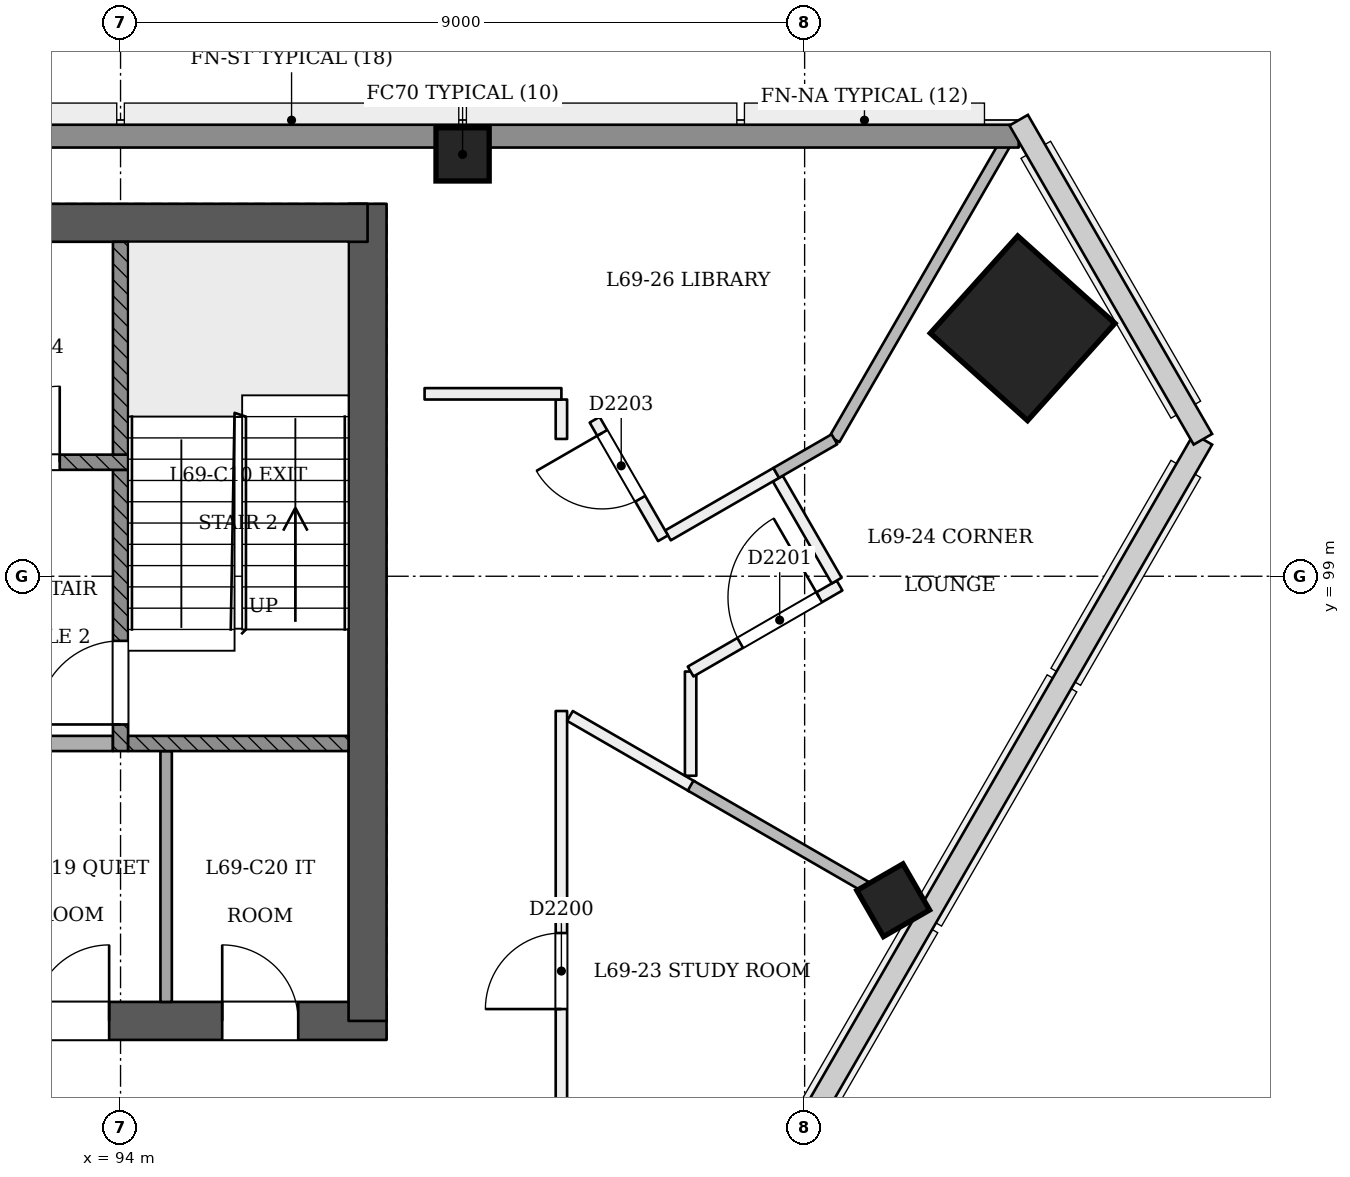
"""IFC4 building model, lengths in metres.
Left out: names, types, materials, properties, quantities, classifications, styles, units other than length and angle.
Written with IfcOpenShell. Run it as: python <this file> out.ifc"""

import sys

from ifc_helpers import new_model, si_unit, direction, frame, frame_2d, origin, origin_2d, place, context, subcontext, project, spatial, rectangle, extrude, element, fill, save


model = new_model("IFC4")
c1 = context("Model", 3, precision=1e-05, world=origin(), true_north=direction((0.0, 1.0)))
c2 = subcontext(c1, "Body", "Model", "MODEL_VIEW")
j1 = project(units=[si_unit("LENGTHUNIT", "METRE"), si_unit("PLANEANGLEUNIT", "RADIAN")], contexts=[c1])
p1 = place(None, origin())
s1 = spatial("IfcSite", under=j1, at=p1, CompositionType="ELEMENT")
p2 = place(p1, origin())
s2 = spatial("IfcBuilding", under=s1, at=p2, CompositionType="ELEMENT")
p3 = place(p2, frame((0.0, 0.0, 268.0)))
s3 = spatial("IfcBuildingStorey", under=s2, at=p3, CompositionType="ELEMENT", Elevation=268.0)
p4 = place(p3, frame((72.75, 93.15, 0.0), z_axis=(0.0, 0.0, 1.0), x_axis=(1.0, 0.0, 0.0)))
e1 = element("IfcWall", 1, at=p4, inside=s3, PredefinedType="SHEAR", context=c2, shape_type="SweptSolid", body=[
    extrude(rectangle(XDim=24.75, YDim=0.5, at=frame_2d((12.375, 0.0))), origin(), (0.0, 0.0, 1.0), 3.6),
])
p5 = place(p4, frame((1.05, 0.0, 0.0)))
e2 = element("IfcOpeningElement", 2, at=p5, cuts=e1, PredefinedType="OPENING", context=c2, shape_type="SweptSolid", body=[
    extrude(rectangle(XDim=1.2, YDim=2.1, at=frame_2d((0.6, 1.05))), frame((0.0, 0.26, 0.0), z_axis=(0.0, -1.0, 0.0), x_axis=(1.0, 0.0, 0.0)), (0.0, 0.0, 1.0), 0.521),
])
p6 = place(p4, frame((3.25, 0.0, 0.0)))
e3 = element("IfcOpeningElement", 3, at=p6, cuts=e1, PredefinedType="OPENING", context=c2, shape_type="SweptSolid", body=[
    extrude(rectangle(XDim=1.2, YDim=2.1, at=frame_2d((0.6, 1.05))), frame((0.0, 0.26, 0.0), z_axis=(0.0, -1.0, 0.0), x_axis=(1.0, 0.0, 0.0)), (0.0, 0.0, 1.0), 0.521),
])
p7 = place(p4, frame((13.25, 0.0, 0.0)))
e4 = element("IfcOpeningElement", 4, at=p7, cuts=e1, PredefinedType="OPENING", context=c2, shape_type="SweptSolid", body=[
    extrude(rectangle(XDim=1.2, YDim=2.1, at=frame_2d((0.6, 1.05))), frame((0.0, 0.26, 0.0), z_axis=(0.0, -1.0, 0.0), x_axis=(1.0, 0.0, 0.0)), (0.0, 0.0, 1.0), 0.521),
])
p8 = place(p4, frame((15.312, 0.0, 0.0)))
e5 = element("IfcOpeningElement", 5, at=p8, cuts=e1, PredefinedType="OPENING", context=c2, shape_type="SweptSolid", body=[
    extrude(rectangle(XDim=1.0, YDim=2.1, at=frame_2d((0.5, 1.05))), frame((0.0, 0.26, 0.0), z_axis=(0.0, -1.0, 0.0), x_axis=(1.0, 0.0, 0.0)), (0.0, 0.0, 1.0), 0.521),
])
p9 = place(p4, frame((17.55, 0.0, 0.0)))
e6 = element("IfcOpeningElement", 6, at=p9, cuts=e1, PredefinedType="OPENING", context=c2, shape_type="SweptSolid", body=[
    extrude(rectangle(XDim=1.0, YDim=2.1, at=frame_2d((0.5, 1.05))), frame((0.0, 0.26, 0.0), z_axis=(0.0, -1.0, 0.0), x_axis=(1.0, 0.0, 0.0)), (0.0, 0.0, 1.0), 0.521),
])
p10 = place(p4, frame((20.1, 0.0, 0.0)))
e7 = element("IfcOpeningElement", 7, at=p10, cuts=e1, PredefinedType="OPENING", context=c2, shape_type="SweptSolid", body=[
    extrude(rectangle(XDim=1.0, YDim=2.1, at=frame_2d((0.5, 1.05))), frame((0.0, 0.26, 0.0), z_axis=(0.0, -1.0, 0.0), x_axis=(1.0, 0.0, 0.0)), (0.0, 0.0, 1.0), 0.521),
])
p11 = place(p4, frame((22.587, 0.0, 0.0)))
e8 = element("IfcOpeningElement", 8, at=p11, cuts=e1, PredefinedType="OPENING", context=c2, shape_type="SweptSolid", body=[
    extrude(rectangle(XDim=1.0, YDim=2.1, at=frame_2d((0.5, 1.05))), frame((0.0, 0.26, 0.0), z_axis=(0.0, -1.0, 0.0), x_axis=(1.0, 0.0, 0.0)), (0.0, 0.0, 1.0), 0.521),
])
p12 = place(p3, frame((97.25, 93.15, 0.0), z_axis=(0.0, 0.0, 1.0), x_axis=(0.0, 1.0, 0.0)))
e9 = element("IfcWall", 9, at=p12, inside=s3, PredefinedType="SHEAR", context=c2, shape_type="SweptSolid", body=[
    extrude(rectangle(XDim=10.75, YDim=0.5, at=frame_2d((5.375, 0.0))), origin(), (0.0, 0.0, 1.0), 3.6),
])
p13 = place(p3, frame((97.25, 103.65, 0.0), z_axis=(0.0, 0.0, 1.0), x_axis=(-1.0, 0.0, 0.0)))
e10 = element("IfcWall", 10, at=p13, inside=s3, PredefinedType="SHEAR", context=c2, shape_type="SweptSolid", body=[
    extrude(rectangle(XDim=24.75, YDim=0.5, at=frame_2d((12.375, 0.0))), origin(), (0.0, 0.0, 1.0), 3.6),
])
p14 = place(p3, frame((105.902, 102.251, 0.0), z_axis=(-0.028401796786, 0.009286506348, 0.999553449666), x_axis=(0.498876209332, -0.866388246574, 0.022224625084)))
e11 = element("IfcColumn", 11, at=p14, inside=s3, PredefinedType="COLUMN", context=c2, shape_type="SweptSolid", body=[
    extrude(rectangle(XDim=1.72, YDim=1.72, at=origin_2d()), origin(), (0.0, 0.0, 1.0), 3.602),
])
p15 = place(p3, frame((98.5, 104.55, 0.0), z_axis=(0.0, 0.0, 1.0), x_axis=(1.0, 0.0, 0.0)))
e12 = element("IfcColumn", 12, at=p15, inside=s3, PredefinedType="COLUMN", context=c2, shape_type="SweptSolid", body=[
    extrude(rectangle(XDim=0.7, YDim=0.7, at=origin_2d()), origin(), (0.0, 0.0, 1.0), 3.6),
])
p16 = place(p3, frame((104.192, 94.69, -0.021), z_axis=(-0.02215369191, 0.038413282303, 0.999016333038), x_axis=(-0.500652759639, -0.865364210869, 0.022171982582)))
e13 = element("IfcColumn", 13, at=p16, inside=s3, PredefinedType="COLUMN", context=c2, shape_type="SweptSolid", body=[
    extrude(rectangle(XDim=0.7, YDim=0.7, at=origin_2d()), origin(), (0.0, 0.0, 1.0), 3.604),
])
p17 = place(p3, frame((99.8, 90.6, 0.0), z_axis=(0.0, 0.0, 1.0), x_axis=(0.0, 1.0, 0.0)))
e14 = element("IfcWall", 14, at=p17, inside=s3, PredefinedType="PARTITIONING", context=c2, shape_type="SweptSolid", body=[
    extrude(rectangle(XDim=6.627, YDim=0.15, at=frame_2d((3.313, 0.0))), origin(), (0.0, 0.0, 1.0), 3.2),
])
p18 = place(p17, frame((2.706, 0.0, 0.0)))
e15 = element("IfcOpeningElement", 15, at=p18, cuts=e14, PredefinedType="OPENING", context=c2, shape_type="SweptSolid", body=[
    extrude(rectangle(XDim=1.0, YDim=2.1, at=frame_2d((0.5, 1.05))), frame((0.0, 0.085, 0.0), z_axis=(0.0, -1.0, 0.0), x_axis=(1.0, 0.0, 0.0)), (0.0, 0.0, 1.0), 0.171),
])
p19 = place(p3, frame((99.913, 97.162, 0.0), z_axis=(0.0, 0.0, 1.0), x_axis=(0.866021029023, -0.500007577232, 0.0)))
e16 = element("IfcWall", 16, at=p19, inside=s3, PredefinedType="PARTITIONING", context=c2, shape_type="SweptSolid", body=[
    extrude(rectangle(XDim=1.853, YDim=0.15, at=frame_2d((0.927, 0.0))), origin(), (0.0, 0.0, 1.0), 3.2),
])
p20 = place(p3, frame((101.5, 96.375, 0.0), z_axis=(0.0, 0.0, 1.0), x_axis=(0.0, 1.0, 0.0)))
e17 = element("IfcWall", 17, at=p20, inside=s3, PredefinedType="PARTITIONING", context=c2, shape_type="SweptSolid", body=[
    extrude(rectangle(XDim=1.371, YDim=0.15, at=frame_2d((0.686, 0.0))), origin(), (0.0, 0.0, 1.0), 3.2),
])
p21 = place(p3, frame((101.5, 97.747, 0.0), z_axis=(0.0, 0.0, 1.0), x_axis=(0.866036427558, 0.499980905779, 0.0)))
e18 = element("IfcWall", 18, at=p21, inside=s3, PredefinedType="PARTITIONING", context=c2, shape_type="SweptSolid", body=[
    extrude(rectangle(XDim=2.262, YDim=0.15, at=frame_2d((1.131, 0.0))), origin(), (0.0, 0.0, 1.0), 3.2),
])
p22 = place(p21, frame((0.753, 0.0, 0.0)))
e19 = element("IfcOpeningElement", 19, at=p22, cuts=e18, PredefinedType="OPENING", context=c2, shape_type="SweptSolid", body=[
    extrude(rectangle(XDim=1.2, YDim=2.1, at=frame_2d((0.6, 1.05))), frame((0.0, 0.085, 0.0), z_axis=(0.0, -1.0, 0.0), x_axis=(1.0, 0.0, 0.0)), (0.0, 0.0, 1.0), 0.171),
])
p23 = place(p3, frame((103.422, 98.943, 0.0), z_axis=(0.0, 0.0, 1.0), x_axis=(-0.500017819788, 0.86601511528, 0.0)))
e20 = element("IfcWall", 20, at=p23, inside=s3, PredefinedType="PARTITIONING", context=c2, shape_type="SweptSolid", body=[
    extrude(rectangle(XDim=1.55, YDim=0.15, at=frame_2d((0.775, 0.0))), origin(), (0.0, 0.0, 1.0), 3.2),
])
p24 = place(p3, frame((102.627, 100.36, 0.0), z_axis=(0.0, 0.0, 1.0), x_axis=(-0.866052144996, -0.499953680002, 0.0)))
e21 = element("IfcWall", 21, at=p24, inside=s3, PredefinedType="PARTITIONING", context=c2, shape_type="SweptSolid", body=[
    extrude(rectangle(XDim=1.645, YDim=0.15, at=frame_2d((0.823, 0.0))), origin(), (0.0, 0.0, 1.0), 3.2),
])
p25 = place(p3, frame((101.137, 99.5, 0.0), z_axis=(0.0, 0.0, 1.0), x_axis=(-0.499961193289, 0.866047807691, 0.0)))
e22 = element("IfcWall", 22, at=p25, inside=s3, PredefinedType="PARTITIONING", context=c2, shape_type="SweptSolid", body=[
    extrude(rectangle(XDim=1.8, YDim=0.15, at=frame_2d((0.9, 0.0))), origin(), (0.0, 0.0, 1.0), 3.2),
])
p26 = place(p25, frame((0.6, 0.0, 0.0)))
e23 = element("IfcOpeningElement", 23, at=p26, cuts=e22, PredefinedType="OPENING", context=c2, shape_type="SweptSolid", body=[
    extrude(rectangle(XDim=1.0, YDim=2.1, at=frame_2d((0.5, 1.05))), frame((0.0, 0.085, 0.0), z_axis=(0.0, -1.0, 0.0), x_axis=(1.0, 0.0, 0.0)), (0.0, 0.0, 1.0), 0.171),
])
p27 = place(p3, frame((99.8, 100.806, 0.0), z_axis=(0.0, 0.0, 1.0), x_axis=(0.0, 1.0, 0.0)))
e24 = element("IfcWall", 24, at=p27, inside=s3, PredefinedType="PARTITIONING", context=c2, shape_type="SweptSolid", body=[
    extrude(rectangle(XDim=0.519, YDim=0.15, at=frame_2d((0.259, 0.0))), origin(), (0.0, 0.0, 1.0), 3.2),
])
p28 = place(p3, frame((99.8, 101.4, 0.0), z_axis=(0.0, 0.0, 1.0), x_axis=(-1.0, 0.0, 0.0)))
e25 = element("IfcWall", 25, at=p28, inside=s3, PredefinedType="PARTITIONING", context=c2, shape_type="SweptSolid", body=[
    extrude(rectangle(XDim=1.8, YDim=0.15, at=frame_2d((0.9, 0.0))), origin(), (0.0, 0.0, 1.0), 3.2),
])
p29 = place(p3, frame((104.495, 94.516, 0.0), z_axis=(0.0, 0.0, 1.0), x_axis=(-0.866053925764, 0.499950595228, 0.0)))
e26 = element("IfcWall", 26, at=p29, inside=s3, PredefinedType="PARTITIONING", context=c2, shape_type="SweptSolid", body=[
    extrude(rectangle(XDim=3.458, YDim=0.15, at=frame_2d((1.729, 0.0))), origin(), (0.0, 0.0, 1.0), 2.7),
])
p30 = place(p3, frame((105.758, 104.9, 0.0), z_axis=(0.0, 0.0, 1.0), x_axis=(-0.500006800136, -0.866021477689, 0.0)))
e27 = element("IfcWall", 27, at=p30, inside=s3, PredefinedType="PARTITIONING", context=c2, shape_type="SweptSolid", body=[
    extrude(rectangle(XDim=4.732, YDim=0.15, at=frame_2d((2.366, 0.0))), origin(), (0.0, 0.0, 1.0), 2.7),
])
p31 = place(p3, frame((103.392, 100.802, 0.0), z_axis=(0.0, 0.0, 1.0), x_axis=(-0.866093614288, -0.499881837328, 0.0)))
e28 = element("IfcWall", 28, at=p31, inside=s3, PredefinedType="PARTITIONING", context=c2, shape_type="SweptSolid", body=[
    extrude(rectangle(XDim=0.884, YDim=0.15, at=frame_2d((0.442, 0.0))), origin(), (0.0, 0.0, 1.0), 3.2),
])
p32 = place(p3, frame((64.184, 104.79, 0.0), z_axis=(0.0, 0.0, 1.0), x_axis=(1.0, 0.0, 0.0)))
e29 = element("IfcWall", 29, at=p32, inside=s3, PredefinedType="SOLIDWALL", context=c2, shape_type="SweptSolid", body=[
    extrude(rectangle(XDim=41.632, YDim=0.3, at=frame_2d((20.816, 0.0))), origin(), (0.0, 0.0, 1.0), 2.7),
])
p33 = place(p3, frame((94.6, 93.4, 0.0), z_axis=(0.0, 0.0, 1.0), x_axis=(0.0, 1.0, 0.0)))
e30 = element("IfcWall", 30, at=p33, inside=s3, PredefinedType="PARTITIONING", context=c2, shape_type="SweptSolid", body=[
    extrude(rectangle(XDim=3.3, YDim=0.15, at=frame_2d((1.65, 0.0))), origin(), (0.0, 0.0, 1.0), 3.2),
])
p34 = place(p3, frame((91.5, 96.8, 0.0), z_axis=(0.0, 0.0, 1.0), x_axis=(1.0, 0.0, 0.0)))
e31 = element("IfcWall", 31, at=p34, inside=s3, PredefinedType="PARTITIONING", context=c2, shape_type="SweptSolid", body=[
    extrude(rectangle(XDim=2.4, YDim=0.2, at=frame_2d((1.2, 0.0))), origin(), (0.0, 0.0, 1.0), 3.2),
])
p35 = place(p3, frame((94.0, 96.7, 0.0), z_axis=(0.0, 0.0, 1.0), x_axis=(0.0, 1.0, 0.0)))
e32 = element("IfcWall", 32, at=p35, inside=s3, PredefinedType="SOLIDWALL", context=c2, shape_type="SweptSolid", body=[
    extrude(rectangle(XDim=3.7, YDim=0.2, at=frame_2d((1.85, 0.0))), origin(), (0.0, 0.0, 1.0), 3.2),
])
p36 = place(p35, frame((0.35, 0.0, 0.0)))
e33 = element("IfcOpeningElement", 33, at=p36, cuts=e32, PredefinedType="OPENING", context=c2, shape_type="SweptSolid", body=[
    extrude(rectangle(XDim=1.1, YDim=2.1, at=frame_2d((0.55, 1.05))), frame((0.0, 0.11, 0.0), z_axis=(0.0, -1.0, 0.0), x_axis=(1.0, 0.0, 0.0)), (0.0, 0.0, 1.0), 0.221),
])
p37 = place(p3, frame((94.1, 96.8, 0.0), z_axis=(0.0, 0.0, 1.0), x_axis=(1.0, 0.0, 0.0)))
e34 = element("IfcWall", 34, at=p37, inside=s3, PredefinedType="SOLIDWALL", context=c2, shape_type="SweptSolid", body=[
    extrude(rectangle(XDim=2.9, YDim=0.2, at=frame_2d((1.45, 0.0))), origin(), (0.0, 0.0, 1.0), 3.2),
])
p38 = place(p3, frame((75.9, 100.5, 0.0), z_axis=(0.0, 0.0, 1.0), x_axis=(1.0, 0.0, 0.0)))
e35 = element("IfcWall", 35, at=p38, inside=s3, PredefinedType="SOLIDWALL", context=c2, shape_type="SweptSolid", body=[
    extrude(rectangle(XDim=18.2, YDim=0.2, at=frame_2d((9.1, 0.0))), origin(), (0.0, 0.0, 1.0), 3.2),
])
p39 = place(p38, frame((2.6, 0.0, 0.0)))
e36 = element("IfcOpeningElement", 36, at=p39, cuts=e35, PredefinedType="OPENING", context=c2, shape_type="SweptSolid", body=[
    extrude(rectangle(XDim=1.1, YDim=2.1, at=frame_2d((0.55, 1.05))), frame((0.0, 0.11, 0.0), z_axis=(0.0, -1.0, 0.0), x_axis=(1.0, 0.0, 0.0)), (0.0, 0.0, 1.0), 0.221),
])
p40 = place(p38, frame((4.5, 0.0, 0.0)))
e37 = element("IfcOpeningElement", 37, at=p40, cuts=e35, PredefinedType="OPENING", context=c2, shape_type="SweptSolid", body=[
    extrude(rectangle(XDim=1.1, YDim=2.1, at=frame_2d((0.55, 1.05))), frame((0.0, 0.11, 0.0), z_axis=(0.0, -1.0, 0.0), x_axis=(1.0, 0.0, 0.0)), (0.0, 0.0, 1.0), 0.221),
])
p41 = place(p38, frame((6.4, 0.0, 0.0)))
e38 = element("IfcOpeningElement", 38, at=p41, cuts=e35, PredefinedType="OPENING", context=c2, shape_type="SweptSolid", body=[
    extrude(rectangle(XDim=1.1, YDim=2.1, at=frame_2d((0.55, 1.05))), frame((0.0, 0.11, 0.0), z_axis=(0.0, -1.0, 0.0), x_axis=(1.0, 0.0, 0.0)), (0.0, 0.0, 1.0), 0.221),
])
p42 = place(p38, frame((8.3, 0.0, 0.0)))
e39 = element("IfcOpeningElement", 39, at=p42, cuts=e35, PredefinedType="OPENING", context=c2, shape_type="SweptSolid", body=[
    extrude(rectangle(XDim=1.1, YDim=2.1, at=frame_2d((0.55, 1.05))), frame((0.0, 0.11, 0.0), z_axis=(0.0, -1.0, 0.0), x_axis=(1.0, 0.0, 0.0)), (0.0, 0.0, 1.0), 0.221),
])
p43 = place(p38, frame((10.2, 0.0, 0.0)))
e40 = element("IfcOpeningElement", 40, at=p43, cuts=e35, PredefinedType="OPENING", context=c2, shape_type="SweptSolid", body=[
    extrude(rectangle(XDim=1.1, YDim=2.1, at=frame_2d((0.55, 1.05))), frame((0.0, 0.11, 0.0), z_axis=(0.0, -1.0, 0.0), x_axis=(1.0, 0.0, 0.0)), (0.0, 0.0, 1.0), 0.221),
])
p44 = place(p38, frame((12.1, 0.0, 0.0)))
e41 = element("IfcOpeningElement", 41, at=p44, cuts=e35, PredefinedType="OPENING", context=c2, shape_type="SweptSolid", body=[
    extrude(rectangle(XDim=1.1, YDim=2.1, at=frame_2d((0.55, 1.05))), frame((0.0, 0.11, 0.0), z_axis=(0.0, -1.0, 0.0), x_axis=(1.0, 0.0, 0.0)), (0.0, 0.0, 1.0), 0.221),
])
p45 = place(p38, frame((14.0, 0.0, 0.0)))
e42 = element("IfcOpeningElement", 42, at=p45, cuts=e35, PredefinedType="OPENING", context=c2, shape_type="SweptSolid", body=[
    extrude(rectangle(XDim=1.1, YDim=2.1, at=frame_2d((0.55, 1.05))), frame((0.0, 0.11, 0.0), z_axis=(0.0, -1.0, 0.0), x_axis=(1.0, 0.0, 0.0)), (0.0, 0.0, 1.0), 0.221),
])
p46 = place(p38, frame((0.65, 0.0, 0.0)))
e43 = element("IfcOpeningElement", 43, at=p46, cuts=e35, PredefinedType="OPENING", context=c2, shape_type="SweptSolid", body=[
    extrude(rectangle(XDim=1.0, YDim=2.1, at=frame_2d((0.5, 1.05))), frame((0.0, 0.11, 0.0), z_axis=(0.0, -1.0, 0.0), x_axis=(1.0, 0.0, 0.0)), (0.0, 0.0, 1.0), 0.221),
])
p47 = place(p38, frame((16.3, 0.0, 0.0)))
e44 = element("IfcOpeningElement", 44, at=p47, cuts=e35, PredefinedType="OPENING", context=c2, shape_type="SweptSolid", body=[
    extrude(rectangle(XDim=1.0, YDim=2.1, at=frame_2d((0.5, 1.05))), frame((0.0, 0.11, 0.0), z_axis=(0.0, -1.0, 0.0), x_axis=(1.0, 0.0, 0.0)), (0.0, 0.0, 1.0), 0.221),
])
p48 = place(p3, frame((94.0, 100.6, 0.0), z_axis=(0.0, 0.0, 1.0), x_axis=(0.0, 1.0, 0.0)))
e45 = element("IfcWall", 45, at=p48, inside=s3, PredefinedType="SOLIDWALL", context=c2, shape_type="SweptSolid", body=[
    extrude(rectangle(XDim=2.8, YDim=0.2, at=frame_2d((1.4, 0.0))), origin(), (0.0, 0.0, 1.0), 3.2),
])
p49 = place(p18, origin())
e46 = element("IfcDoor", 46, at=p49, inside=s3, OperationType="SINGLE_SWING_LEFT", PredefinedType="NOTDEFINED", context=c2, shape_type="SweptSolid", body=[
    extrude(rectangle(XDim=1.0, YDim=2.1, at=frame_2d((0.5, 1.05))), frame((0.0, 0.025, 0.0), z_axis=(0.0, -1.0, 0.0), x_axis=(1.0, 0.0, 0.0)), (0.0, 0.0, 1.0), 0.05),
])
fill(e15, e46)
p50 = place(p22, origin())
e47 = element("IfcDoor", 47, at=p50, inside=s3, OperationType="SINGLE_SWING_RIGHT", PredefinedType="NOTDEFINED", context=c2, shape_type="SweptSolid", body=[
    extrude(rectangle(XDim=1.2, YDim=2.1, at=frame_2d((0.6, 1.05))), frame((0.0, 0.025, 0.0), z_axis=(0.0, -1.0, 0.0), x_axis=(1.0, 0.0, 0.0)), (0.0, 0.0, 1.0), 0.05),
])
fill(e19, e47)
p51 = place(p26, origin())
e48 = element("IfcDoor", 48, at=p51, inside=s3, OperationType="SINGLE_SWING_RIGHT", PredefinedType="NOTDEFINED", context=c2, shape_type="SweptSolid", body=[
    extrude(rectangle(XDim=1.0, YDim=2.1, at=frame_2d((0.5, 1.05))), frame((0.0, 0.025, 0.0), z_axis=(0.0, -1.0, 0.0), x_axis=(1.0, 0.0, 0.0)), (0.0, 0.0, 1.0), 0.05),
])
fill(e23, e48)
p52 = place(p36, origin())
e49 = element("IfcDoor", 49, at=p52, inside=s3, OperationType="SINGLE_SWING_LEFT", PredefinedType="NOTDEFINED", context=c2, shape_type="SweptSolid", body=[
    extrude(rectangle(XDim=1.1, YDim=2.1, at=frame_2d((0.55, 1.05))), frame((0.0, 0.025, 0.0), z_axis=(0.0, -1.0, 0.0), x_axis=(1.0, 0.0, 0.0)), (0.0, 0.0, 1.0), 0.05),
])
fill(e33, e49)
p53 = place(p47, origin())
e50 = element("IfcDoor", 50, at=p53, inside=s3, OperationType="SINGLE_SWING_RIGHT", PredefinedType="NOTDEFINED", context=c2, shape_type="SweptSolid", body=[
    extrude(rectangle(XDim=1.0, YDim=2.1, at=frame_2d((0.5, 1.05))), frame((0.0, 0.025, 0.0), z_axis=(0.0, -1.0, 0.0), x_axis=(1.0, 0.0, 0.0)), (0.0, 0.0, 1.0), 0.05),
])
fill(e44, e50)
p54 = place(p10, origin())
e51 = element("IfcDoor", 51, at=p54, inside=s3, OperationType="SINGLE_SWING_RIGHT", PredefinedType="NOTDEFINED", context=c2, shape_type="SweptSolid", body=[
    extrude(rectangle(XDim=1.0, YDim=2.1, at=frame_2d((0.5, 1.05))), frame((0.0, 0.025, 0.0), z_axis=(0.0, -1.0, 0.0), x_axis=(1.0, 0.0, 0.0)), (0.0, 0.0, 1.0), 0.05),
])
fill(e7, e51)
p55 = place(p11, origin())
e52 = element("IfcDoor", 52, at=p55, inside=s3, OperationType="SINGLE_SWING_LEFT", PredefinedType="NOTDEFINED", context=c2, shape_type="SweptSolid", body=[
    extrude(rectangle(XDim=1.0, YDim=2.1, at=frame_2d((0.5, 1.05))), frame((0.0, 0.025, 0.0), z_axis=(0.0, -1.0, 0.0), x_axis=(1.0, 0.0, 0.0)), (0.0, 0.0, 1.0), 0.05),
])
fill(e8, e52)
save(model, sys.argv[1])
